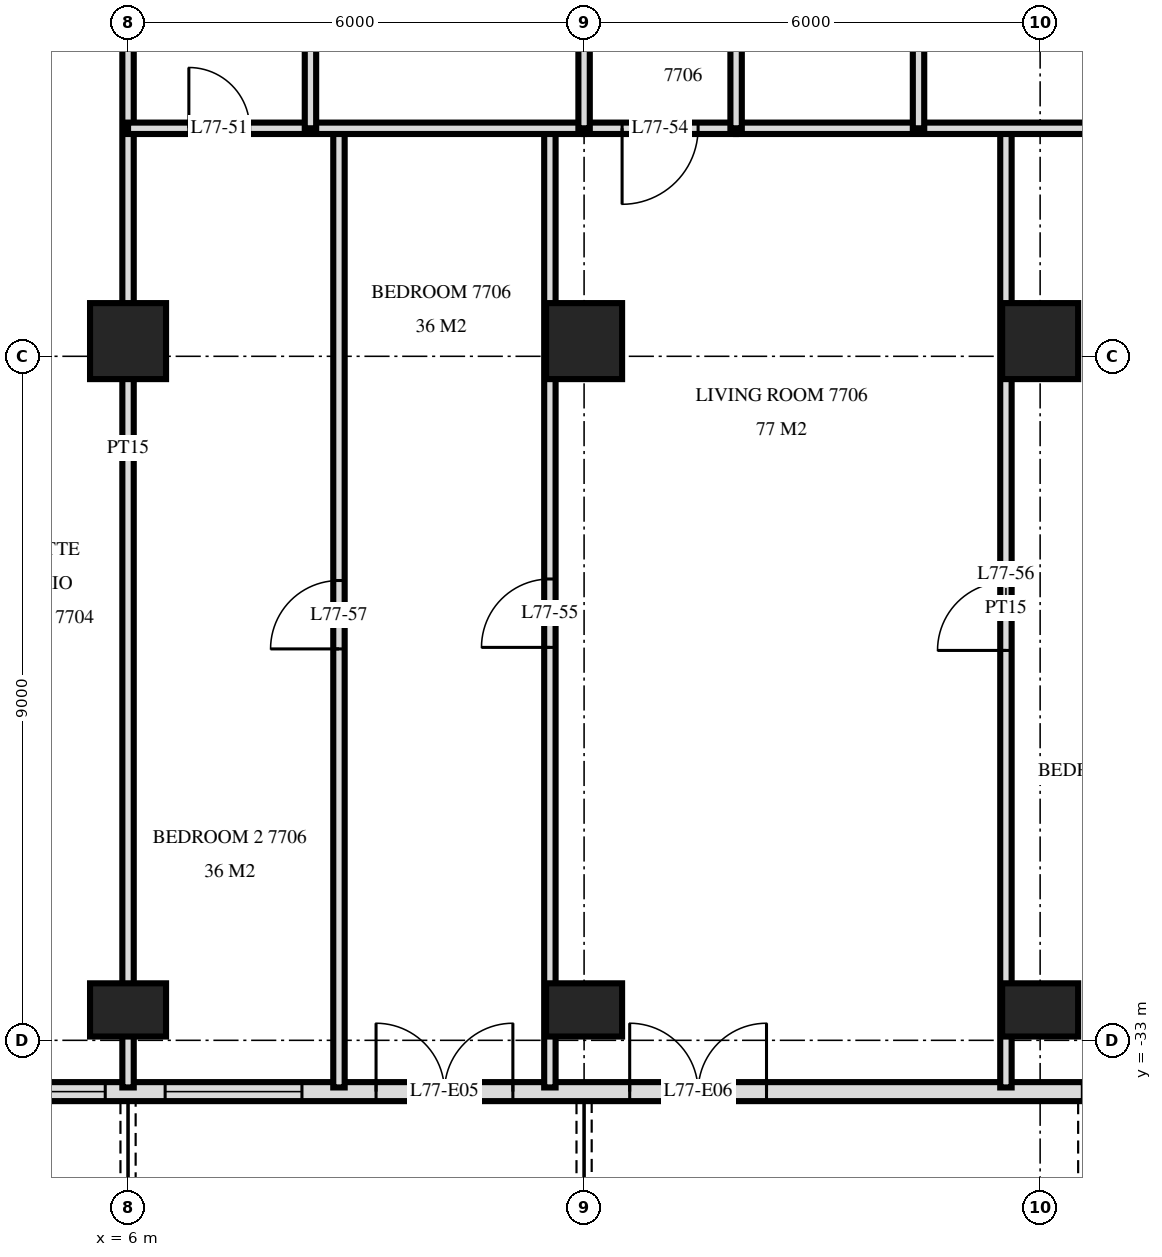
"""IFC4 building model, lengths in metres.
Left out: names, types, materials, properties, quantities, classifications, styles, units other than length and angle.
Written with IfcOpenShell. Run it as: python <this file> out.ifc"""

import sys

from ifc_helpers import new_model, si_unit, direction, frame, frame_2d, origin, origin_2d, place, context, subcontext, project, spatial, rectangle, extrude, element, fill, save


model = new_model("IFC4")
c1 = context("Model", 3, precision=1e-05, world=origin(), true_north=direction((0.0, 1.0)))
c2 = subcontext(c1, "Body", "Model", "MODEL_VIEW")
j1 = project(units=[si_unit("LENGTHUNIT", "METRE"), si_unit("PLANEANGLEUNIT", "RADIAN")], contexts=[c1])
p1 = place(None, origin())
s1 = spatial("IfcSite", under=j1, at=p1, CompositionType="ELEMENT")
p2 = place(p1, origin())
s2 = spatial("IfcBuilding", under=s1, at=p2, CompositionType="ELEMENT")
p3 = place(p2, frame((0.0, 0.0, 291.1)))
s3 = spatial("IfcBuildingStorey", under=s2, at=p3, CompositionType="ELEMENT", Elevation=291.1)
p4 = place(p3, frame((6.0, -32.6, 0.0), z_axis=(0.0, 0.0, 1.0), x_axis=(1.0, 0.0, 0.0)))
e1 = element("IfcColumn", 1, at=p4, inside=s3, PredefinedType="COLUMN", context=c2, shape_type="SweptSolid", body=[
    extrude(rectangle(XDim=1.0, YDim=0.7, at=origin_2d()), origin(), (0.0, 0.0, 1.0), 3.5),
])
p5 = place(p3, frame((6.0, -23.8, 0.0), z_axis=(0.0, 0.0, 1.0), x_axis=(1.0, 0.0, 0.0)))
e2 = element("IfcColumn", 2, at=p5, inside=s3, PredefinedType="COLUMN", context=c2, shape_type="SweptSolid", body=[
    extrude(rectangle(XDim=1.0, YDim=1.0, at=origin_2d()), origin(), (0.0, 0.0, 1.0), 3.5),
])
p6 = place(p3, frame((12.0, -32.6, 0.0), z_axis=(0.0, 0.0, 1.0), x_axis=(1.0, 0.0, 0.0)))
e3 = element("IfcColumn", 3, at=p6, inside=s3, PredefinedType="COLUMN", context=c2, shape_type="SweptSolid", body=[
    extrude(rectangle(XDim=1.0, YDim=0.7, at=origin_2d()), origin(), (0.0, 0.0, 1.0), 3.5),
])
p7 = place(p3, frame((12.0, -23.8, 0.0), z_axis=(0.0, 0.0, 1.0), x_axis=(1.0, 0.0, 0.0)))
e4 = element("IfcColumn", 4, at=p7, inside=s3, PredefinedType="COLUMN", context=c2, shape_type="SweptSolid", body=[
    extrude(rectangle(XDim=1.0, YDim=1.0, at=origin_2d()), origin(), (0.0, 0.0, 1.0), 3.5),
])
p8 = place(p3, frame((18.0, -32.6, 0.0), z_axis=(0.0, 0.0, 1.0), x_axis=(1.0, 0.0, 0.0)))
e5 = element("IfcColumn", 5, at=p8, inside=s3, PredefinedType="COLUMN", context=c2, shape_type="SweptSolid", body=[
    extrude(rectangle(XDim=1.0, YDim=0.7, at=origin_2d()), origin(), (0.0, 0.0, 1.0), 3.5),
])
p9 = place(p3, frame((18.0, -23.8, 0.0), z_axis=(0.0, 0.0, 1.0), x_axis=(1.0, 0.0, 0.0)))
e6 = element("IfcColumn", 6, at=p9, inside=s3, PredefinedType="COLUMN", context=c2, shape_type="SweptSolid", body=[
    extrude(rectangle(XDim=1.0, YDim=1.0, at=origin_2d()), origin(), (0.0, 0.0, 1.0), 3.5),
])
p10 = place(p3, frame((-18.575, -33.675, 0.0), z_axis=(0.0, 0.0, 1.0), x_axis=(1.0, 0.0, 0.0)))
e7 = element("IfcWall", 7, at=p10, inside=s3, PredefinedType="SOLIDWALL", context=c2, shape_type="SweptSolid", body=[
    extrude(rectangle(XDim=37.151, YDim=0.25, at=frame_2d((18.575, 0.0))), origin(), (0.0, 0.0, 1.0), 3.22),
])
p11 = place(p10, frame((1.175, 0.0, 0.0)))
e8 = element("IfcOpeningElement", 8, at=p11, cuts=e7, PredefinedType="OPENING", context=c2, shape_type="SweptSolid", body=[
    extrude(rectangle(XDim=1.8, YDim=2.4, at=frame_2d((0.9, 1.2))), frame((0.0, 0.135, 0.0), z_axis=(0.0, -1.0, 0.0), x_axis=(1.0, 0.0, 0.0)), (0.0, 0.0, 1.0), 0.27),
])
p12 = place(p10, frame((4.4, 0.0, 0.9)))
e9 = element("IfcOpeningElement", 9, at=p12, cuts=e7, PredefinedType="OPENING", context=c2, shape_type="SweptSolid", body=[
    extrude(rectangle(XDim=1.8, YDim=1.5, at=frame_2d((0.9, 0.75))), frame((0.0, 0.135, 0.0), z_axis=(0.0, -1.0, 0.0), x_axis=(1.0, 0.0, 0.0)), (0.0, 0.0, 1.0), 0.27),
])
p13 = place(p10, frame((6.875, 0.0, 0.9)))
e10 = element("IfcOpeningElement", 10, at=p13, cuts=e7, PredefinedType="OPENING", context=c2, shape_type="SweptSolid", body=[
    extrude(rectangle(XDim=2.4, YDim=1.5, at=frame_2d((1.2, 0.75))), frame((0.0, 0.135, 0.0), z_axis=(0.0, -1.0, 0.0), x_axis=(1.0, 0.0, 0.0)), (0.0, 0.0, 1.0), 0.27),
])
p14 = place(p10, frame((10.175, 0.0, 0.0)))
e11 = element("IfcOpeningElement", 11, at=p14, cuts=e7, PredefinedType="OPENING", context=c2, shape_type="SweptSolid", body=[
    extrude(rectangle(XDim=1.8, YDim=2.4, at=frame_2d((0.9, 1.2))), frame((0.0, 0.135, 0.0), z_axis=(0.0, -1.0, 0.0), x_axis=(1.0, 0.0, 0.0)), (0.0, 0.0, 1.0), 0.27),
])
p15 = place(p10, frame((13.175, 0.0, 0.0)))
e12 = element("IfcOpeningElement", 12, at=p15, cuts=e7, PredefinedType="OPENING", context=c2, shape_type="SweptSolid", body=[
    extrude(rectangle(XDim=1.8, YDim=2.4, at=frame_2d((0.9, 1.2))), frame((0.0, 0.135, 0.0), z_axis=(0.0, -1.0, 0.0), x_axis=(1.0, 0.0, 0.0)), (0.0, 0.0, 1.0), 0.27),
])
p16 = place(p10, frame((15.875, 0.0, 0.9)))
e13 = element("IfcOpeningElement", 13, at=p16, cuts=e7, PredefinedType="OPENING", context=c2, shape_type="SweptSolid", body=[
    extrude(rectangle(XDim=2.4, YDim=1.5, at=frame_2d((1.2, 0.75))), frame((0.0, 0.135, 0.0), z_axis=(0.0, -1.0, 0.0), x_axis=(1.0, 0.0, 0.0)), (0.0, 0.0, 1.0), 0.27),
])
p17 = place(p10, frame((19.175, 0.0, 0.0)))
e14 = element("IfcOpeningElement", 14, at=p17, cuts=e7, PredefinedType="OPENING", context=c2, shape_type="SweptSolid", body=[
    extrude(rectangle(XDim=1.8, YDim=2.4, at=frame_2d((0.9, 1.2))), frame((0.0, 0.135, 0.0), z_axis=(0.0, -1.0, 0.0), x_axis=(1.0, 0.0, 0.0)), (0.0, 0.0, 1.0), 0.27),
])
p18 = place(p10, frame((21.875, 0.0, 0.9)))
e15 = element("IfcOpeningElement", 15, at=p18, cuts=e7, PredefinedType="OPENING", context=c2, shape_type="SweptSolid", body=[
    extrude(rectangle(XDim=2.4, YDim=1.5, at=frame_2d((1.2, 0.75))), frame((0.0, 0.135, 0.0), z_axis=(0.0, -1.0, 0.0), x_axis=(1.0, 0.0, 0.0)), (0.0, 0.0, 1.0), 0.27),
])
p19 = place(p10, frame((25.063, 0.0, 0.9)))
e16 = element("IfcOpeningElement", 16, at=p19, cuts=e7, PredefinedType="OPENING", context=c2, shape_type="SweptSolid", body=[
    extrude(rectangle(XDim=1.8, YDim=1.5, at=frame_2d((0.9, 0.75))), frame((0.0, 0.135, 0.0), z_axis=(0.0, -1.0, 0.0), x_axis=(1.0, 0.0, 0.0)), (0.0, 0.0, 1.0), 0.27),
])
p20 = place(p10, frame((27.838, 0.0, 0.0)))
e17 = element("IfcOpeningElement", 17, at=p20, cuts=e7, PredefinedType="OPENING", context=c2, shape_type="SweptSolid", body=[
    extrude(rectangle(XDim=1.8, YDim=2.4, at=frame_2d((0.9, 1.2))), frame((0.0, 0.135, 0.0), z_axis=(0.0, -1.0, 0.0), x_axis=(1.0, 0.0, 0.0)), (0.0, 0.0, 1.0), 0.27),
])
p21 = place(p10, frame((31.175, 0.0, 0.0)))
e18 = element("IfcOpeningElement", 18, at=p21, cuts=e7, PredefinedType="OPENING", context=c2, shape_type="SweptSolid", body=[
    extrude(rectangle(XDim=1.8, YDim=2.4, at=frame_2d((0.9, 1.2))), frame((0.0, 0.135, 0.0), z_axis=(0.0, -1.0, 0.0), x_axis=(1.0, 0.0, 0.0)), (0.0, 0.0, 1.0), 0.27),
])
p22 = place(p3, frame((17.55, -33.62, 0.0), z_axis=(0.0, 0.0, 1.0), x_axis=(0.0, 1.0, 0.0)))
e19 = element("IfcWall", 19, at=p22, inside=s3, PredefinedType="PARTITIONING", context=c2, shape_type="SweptSolid", body=[
    extrude(rectangle(XDim=12.62, YDim=0.15, at=frame_2d((6.31, 0.0))), origin(), (0.0, 0.0, 1.0), 3.22),
])
p23 = place(p22, frame((5.75, 0.0, 0.0)))
e20 = element("IfcOpeningElement", 20, at=p23, cuts=e19, PredefinedType="OPENING", context=c2, shape_type="SweptSolid", body=[
    extrude(rectangle(XDim=0.9, YDim=2.1, at=frame_2d((0.45, 1.05))), frame((0.0, 0.085, 0.0), z_axis=(0.0, -1.0, 0.0), x_axis=(1.0, 0.0, 0.0)), (0.0, 0.0, 1.0), 0.17),
])
p24 = place(p3, frame((16.4, -21.0, 0.0), z_axis=(0.0, 0.0, 1.0), x_axis=(0.0, 1.0, 0.0)))
e21 = element("IfcWall", 21, at=p24, inside=s3, PredefinedType="PARTITIONING", context=c2, shape_type="SweptSolid", body=[
    extrude(rectangle(XDim=4.2, YDim=0.15, at=frame_2d((2.1, 0.0))), origin(), (0.0, 0.0, 1.0), 3.22),
])
p25 = place(p3, frame((14.0, -21.0, 0.0), z_axis=(0.0, 0.0, 1.0), x_axis=(0.0, 1.0, 0.0)))
e22 = element("IfcWall", 22, at=p25, inside=s3, PredefinedType="PARTITIONING", context=c2, shape_type="SweptSolid", body=[
    extrude(rectangle(XDim=4.2, YDim=0.15, at=frame_2d((2.1, 0.0))), origin(), (0.0, 0.0, 1.0), 3.22),
])
p26 = place(p25, frame((1.6, 0.0, 0.0)))
e23 = element("IfcOpeningElement", 23, at=p26, cuts=e22, PredefinedType="OPENING", context=c2, shape_type="SweptSolid", body=[
    extrude(rectangle(XDim=1.0, YDim=2.1, at=frame_2d((0.5, 1.05))), frame((0.0, 0.085, 0.0), z_axis=(0.0, -1.0, 0.0), x_axis=(1.0, 0.0, 0.0)), (0.0, 0.0, 1.0), 0.17),
])
p27 = place(p3, frame((12.0, -21.0, 0.0), z_axis=(0.0, 0.0, 1.0), x_axis=(0.0, 1.0, 0.0)))
e24 = element("IfcWall", 24, at=p27, inside=s3, PredefinedType="PARTITIONING", context=c2, shape_type="SweptSolid", body=[
    extrude(rectangle(XDim=4.2, YDim=0.15, at=frame_2d((2.1, 0.0))), origin(), (0.0, 0.0, 1.0), 3.22),
])
p28 = place(p27, frame((1.6, 0.0, 0.0)))
e25 = element("IfcOpeningElement", 25, at=p28, cuts=e24, PredefinedType="OPENING", context=c2, shape_type="SweptSolid", body=[
    extrude(rectangle(XDim=1.0, YDim=2.1, at=frame_2d((0.5, 1.05))), frame((0.0, 0.085, 0.0), z_axis=(0.0, -1.0, 0.0), x_axis=(1.0, 0.0, 0.0)), (0.0, 0.0, 1.0), 0.17),
])
p29 = place(p3, frame((11.55, -33.62, 0.0), z_axis=(0.0, 0.0, 1.0), x_axis=(0.0, 1.0, 0.0)))
e26 = element("IfcWall", 26, at=p29, inside=s3, PredefinedType="PARTITIONING", context=c2, shape_type="SweptSolid", body=[
    extrude(rectangle(XDim=12.62, YDim=0.15, at=frame_2d((6.31, 0.0))), origin(), (0.0, 0.0, 1.0), 3.22),
])
p30 = place(p29, frame((5.79, 0.0, 0.0)))
e27 = element("IfcOpeningElement", 27, at=p30, cuts=e26, PredefinedType="OPENING", context=c2, shape_type="SweptSolid", body=[
    extrude(rectangle(XDim=0.9, YDim=2.1, at=frame_2d((0.45, 1.05))), frame((0.0, 0.085, 0.0), z_axis=(0.0, -1.0, 0.0), x_axis=(1.0, 0.0, 0.0)), (0.0, 0.0, 1.0), 0.17),
])
p31 = place(p3, frame((8.775, -33.62, 0.0), z_axis=(0.0, 0.0, 1.0), x_axis=(0.0, 1.0, 0.0)))
e28 = element("IfcWall", 28, at=p31, inside=s3, PredefinedType="PARTITIONING", context=c2, shape_type="SweptSolid", body=[
    extrude(rectangle(XDim=12.62, YDim=0.15, at=frame_2d((6.31, 0.0))), origin(), (0.0, 0.0, 1.0), 3.22),
])
p32 = place(p31, frame((5.77, 0.0, 0.0)))
e29 = element("IfcOpeningElement", 29, at=p32, cuts=e28, PredefinedType="OPENING", context=c2, shape_type="SweptSolid", body=[
    extrude(rectangle(XDim=0.9, YDim=2.1, at=frame_2d((0.45, 1.05))), frame((0.0, 0.085, 0.0), z_axis=(0.0, -1.0, 0.0), x_axis=(1.0, 0.0, 0.0)), (0.0, 0.0, 1.0), 0.17),
])
p33 = place(p3, frame((8.4, -21.0, 0.0), z_axis=(0.0, 0.0, 1.0), x_axis=(0.0, 1.0, 0.0)))
e30 = element("IfcWall", 30, at=p33, inside=s3, PredefinedType="PARTITIONING", context=c2, shape_type="SweptSolid", body=[
    extrude(rectangle(XDim=4.2, YDim=0.15, at=frame_2d((2.1, 0.0))), origin(), (0.0, 0.0, 1.0), 3.22),
])
p34 = place(p3, frame((6.0, -33.62, 0.0), z_axis=(0.0, 0.0, 1.0), x_axis=(0.0, 1.0, 0.0)))
e31 = element("IfcWall", 31, at=p34, inside=s3, PredefinedType="PARTITIONING", context=c2, shape_type="SweptSolid", body=[
    extrude(rectangle(XDim=16.82, YDim=0.15, at=frame_2d((8.41, 0.0))), origin(), (0.0, 0.0, 1.0), 3.22),
])
p35 = place(p3, frame((12.0, -21.0, 0.0), z_axis=(0.0, 0.0, 1.0), x_axis=(1.0, 0.0, 0.0)))
e32 = element("IfcWall", 32, at=p35, inside=s3, PredefinedType="PARTITIONING", context=c2, shape_type="SweptSolid", body=[
    extrude(rectangle(XDim=2.0, YDim=0.15, at=frame_2d((1.0, 0.0))), origin(), (0.0, 0.0, 1.0), 3.22),
])
p36 = place(p35, frame((0.5, 0.0, 0.0)))
e33 = element("IfcOpeningElement", 33, at=p36, cuts=e32, PredefinedType="OPENING", context=c2, shape_type="SweptSolid", body=[
    extrude(rectangle(XDim=1.0, YDim=2.1, at=frame_2d((0.5, 1.05))), frame((0.0, 0.085, 0.0), z_axis=(0.0, -1.0, 0.0), x_axis=(1.0, 0.0, 0.0)), (0.0, 0.0, 1.0), 0.17),
])
p37 = place(p3, frame((6.0, -21.0, 0.0), z_axis=(0.0, 0.0, 1.0), x_axis=(1.0, 0.0, 0.0)))
e34 = element("IfcWall", 34, at=p37, inside=s3, PredefinedType="PARTITIONING", context=c2, shape_type="SweptSolid", body=[
    extrude(rectangle(XDim=6.0, YDim=0.15, at=frame_2d((3.0, 0.0))), origin(), (0.0, 0.0, 1.0), 3.22),
])
p38 = place(p37, frame((0.8, 0.0, 0.0)))
e35 = element("IfcOpeningElement", 35, at=p38, cuts=e34, PredefinedType="OPENING", context=c2, shape_type="SweptSolid", body=[
    extrude(rectangle(XDim=0.8, YDim=2.1, at=frame_2d((0.4, 1.05))), frame((0.0, 0.085, 0.0), z_axis=(0.0, -1.0, 0.0), x_axis=(1.0, 0.0, 0.0)), (0.0, 0.0, 1.0), 0.17),
])
p39 = place(p3, frame((14.0, -21.0, 0.0), z_axis=(0.0, 0.0, 1.0), x_axis=(1.0, 0.0, 0.0)))
e36 = element("IfcWall", 36, at=p39, inside=s3, PredefinedType="PARTITIONING", context=c2, shape_type="SweptSolid", body=[
    extrude(rectangle(XDim=8.92, YDim=0.15, at=frame_2d((4.46, 0.0))), origin(), (0.0, 0.0, 1.0), 3.22),
])
p40 = place(p18, origin())
e37 = element("IfcWindow", 37, at=p40, inside=s3, PartitioningType="SINGLE_PANEL", PredefinedType="WINDOW", context=c2, shape_type="SweptSolid", body=[
    extrude(rectangle(XDim=2.4, YDim=1.5, at=frame_2d((1.2, 0.75))), frame((0.0, 0.03, 0.0), z_axis=(0.0, -1.0, 0.0), x_axis=(1.0, 0.0, 0.0)), (0.0, 0.0, 1.0), 0.06),
])
fill(e15, e37)
p41 = place(p19, origin())
e38 = element("IfcWindow", 38, at=p41, inside=s3, PartitioningType="SINGLE_PANEL", PredefinedType="WINDOW", context=c2, shape_type="SweptSolid", body=[
    extrude(rectangle(XDim=1.8, YDim=1.5, at=frame_2d((0.9, 0.75))), frame((0.0, 0.03, 0.0), z_axis=(0.0, -1.0, 0.0), x_axis=(1.0, 0.0, 0.0)), (0.0, 0.0, 1.0), 0.06),
])
fill(e16, e38)
p42 = place(p20, origin())
e39 = element("IfcDoor", 39, at=p42, inside=s3, OperationType="DOUBLE_DOOR_SINGLE_SWING", PredefinedType="DOOR", context=c2, shape_type="SweptSolid", body=[
    extrude(rectangle(XDim=1.8, YDim=2.4, at=frame_2d((0.9, 1.2))), frame((0.0, 0.025, 0.0), z_axis=(0.0, -1.0, 0.0), x_axis=(1.0, 0.0, 0.0)), (0.0, 0.0, 1.0), 0.05),
])
fill(e17, e39)
p43 = place(p21, origin())
e40 = element("IfcDoor", 40, at=p43, inside=s3, OperationType="DOUBLE_DOOR_SINGLE_SWING", PredefinedType="DOOR", context=c2, shape_type="SweptSolid", body=[
    extrude(rectangle(XDim=1.8, YDim=2.4, at=frame_2d((0.9, 1.2))), frame((0.0, 0.025, 0.0), z_axis=(0.0, -1.0, 0.0), x_axis=(1.0, 0.0, 0.0)), (0.0, 0.0, 1.0), 0.05),
])
fill(e18, e40)
p44 = place(p38, origin())
e41 = element("IfcDoor", 41, at=p44, inside=s3, OperationType="SINGLE_SWING_RIGHT", PredefinedType="DOOR", context=c2, shape_type="SweptSolid", body=[
    extrude(rectangle(XDim=0.8, YDim=2.1, at=frame_2d((0.4, 1.05))), frame((0.0, 0.025, 0.0), z_axis=(0.0, -1.0, 0.0), x_axis=(1.0, 0.0, 0.0)), (0.0, 0.0, 1.0), 0.05),
])
fill(e35, e41)
p45 = place(p36, frame((0.5, 0.0, 0.0), z_axis=(0.0, 0.0, 1.0), x_axis=(-1.0, 0.0, 0.0)))
e42 = element("IfcDoor", 42, at=p45, inside=s3, OperationType="SINGLE_SWING_LEFT", PredefinedType="DOOR", context=c2, shape_type="SweptSolid", body=[
    extrude(rectangle(XDim=1.0, YDim=2.1, at=frame_2d((0.0, 1.05))), frame((0.0, -0.025, 0.0), z_axis=(0.0, 1.0, 0.0), x_axis=(-1.0, 0.0, 0.0)), (0.0, 0.0, 1.0), 0.05),
])
fill(e33, e42)
p46 = place(p30, origin())
e43 = element("IfcDoor", 43, at=p46, inside=s3, OperationType="SINGLE_SWING_RIGHT", PredefinedType="DOOR", context=c2, shape_type="SweptSolid", body=[
    extrude(rectangle(XDim=0.9, YDim=2.1, at=frame_2d((0.45, 1.05))), frame((0.0, 0.025, 0.0), z_axis=(0.0, -1.0, 0.0), x_axis=(1.0, 0.0, 0.0)), (0.0, 0.0, 1.0), 0.05),
])
fill(e27, e43)
p47 = place(p23, origin())
e44 = element("IfcDoor", 44, at=p47, inside=s3, OperationType="SINGLE_SWING_RIGHT", PredefinedType="DOOR", context=c2, shape_type="SweptSolid", body=[
    extrude(rectangle(XDim=0.9, YDim=2.1, at=frame_2d((0.45, 1.05))), frame((0.0, 0.025, 0.0), z_axis=(0.0, -1.0, 0.0), x_axis=(1.0, 0.0, 0.0)), (0.0, 0.0, 1.0), 0.05),
])
fill(e20, e44)
p48 = place(p32, origin())
e45 = element("IfcDoor", 45, at=p48, inside=s3, OperationType="SINGLE_SWING_RIGHT", PredefinedType="DOOR", context=c2, shape_type="SweptSolid", body=[
    extrude(rectangle(XDim=0.9, YDim=2.1, at=frame_2d((0.45, 1.05))), frame((0.0, 0.025, 0.0), z_axis=(0.0, -1.0, 0.0), x_axis=(1.0, 0.0, 0.0)), (0.0, 0.0, 1.0), 0.05),
])
fill(e29, e45)
save(model, sys.argv[1])
